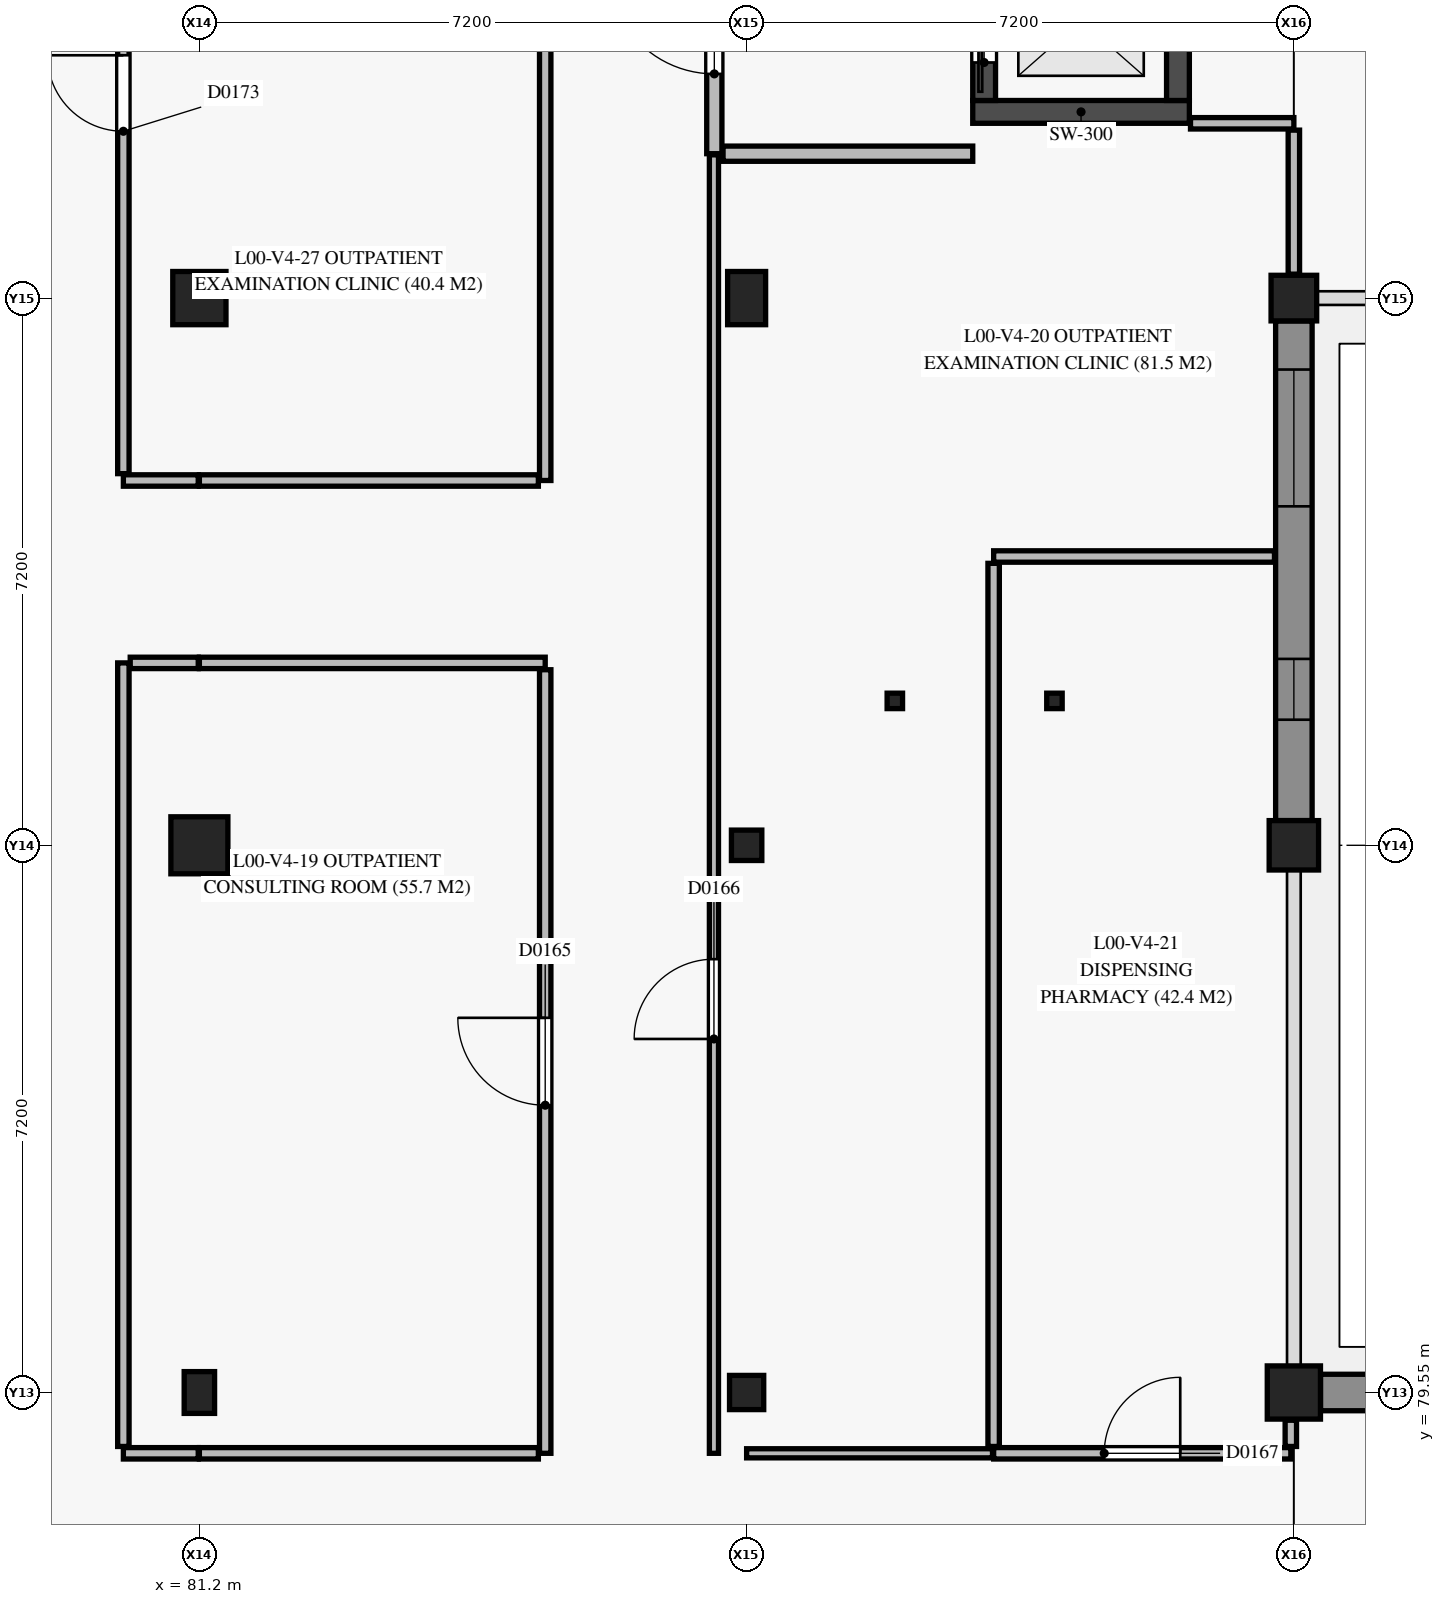
"""IFC4 building model, lengths in metres.
Left out: names, types, materials, properties, quantities, classifications, styles, units other than length and angle.
Written with IfcOpenShell. Run it as: python <this file> out.ifc"""

import sys

from ifc_helpers import new_model, si_unit, direction, frame, frame_2d, origin, origin_2d, place, context, subcontext, project, spatial, rectangle, hollow_rectangle, extrude, element, fill, save


model = new_model("IFC4")
c1 = context("Model", 3, precision=1e-05, world=origin(), true_north=direction((0.0, 1.0)))
c2 = subcontext(c1, "Body", "Model", "MODEL_VIEW")
j1 = project(units=[si_unit("LENGTHUNIT", "METRE"), si_unit("PLANEANGLEUNIT", "RADIAN")], contexts=[c1])
p1 = place(None, origin())
s1 = spatial("IfcSite", under=j1, at=p1, CompositionType="ELEMENT")
p2 = place(p1, origin())
s2 = spatial("IfcBuilding", under=s1, at=p2, CompositionType="ELEMENT")
p3 = place(p2, origin())
s3 = spatial("IfcBuildingStorey", under=s2, at=p3, CompositionType="ELEMENT", Elevation=0.0)
p4 = place(p3, frame((81.2, 79.55, 0.0), z_axis=(0.0, 0.0, 1.0), x_axis=(1.0, 0.0, 0.0)))
e1 = element("IfcColumn", 1, at=p4, inside=s3, PredefinedType="COLUMN", context=c2, shape_type="SweptSolid", body=[
    extrude(rectangle(XDim=0.4, YDim=0.55, at=origin_2d()), origin(), (0.0, 0.0, 1.0), 4.8),
])
p5 = place(p3, frame((81.2, 86.75, 0.0), z_axis=(0.0, 0.0, 1.0), x_axis=(1.0, 0.0, 0.0)))
e2 = element("IfcColumn", 2, at=p5, inside=s3, PredefinedType="COLUMN", context=c2, shape_type="SweptSolid", body=[
    extrude(rectangle(XDim=0.75, YDim=0.75, at=origin_2d()), origin(), (0.0, 0.0, 1.0), 4.8),
])
p6 = place(p3, frame((81.2, 93.95, 0.0), z_axis=(0.0, 0.0, 1.0), x_axis=(1.0, 0.0, 0.0)))
e3 = element("IfcColumn", 3, at=p6, inside=s3, PredefinedType="COLUMN", context=c2, shape_type="SweptSolid", body=[
    extrude(rectangle(XDim=0.7, YDim=0.7, at=origin_2d()), origin(), (0.0, 0.0, 1.0), 4.8),
])
p7 = place(p3, frame((88.4, 79.55, 0.0), z_axis=(0.0, 0.0, 1.0), x_axis=(1.0, 0.0, 0.0)))
e4 = element("IfcColumn", 4, at=p7, inside=s3, PredefinedType="COLUMN", context=c2, shape_type="SweptSolid", body=[
    extrude(rectangle(XDim=0.45, YDim=0.45, at=origin_2d()), origin(), (0.0, 0.0, 1.0), 4.8),
])
p8 = place(p3, frame((88.4, 86.75, 0.0), z_axis=(0.0, 0.0, 1.0), x_axis=(1.0, 0.0, 0.0)))
e5 = element("IfcColumn", 5, at=p8, inside=s3, PredefinedType="COLUMN", context=c2, shape_type="SweptSolid", body=[
    extrude(rectangle(XDim=0.4, YDim=0.4, at=origin_2d()), origin(), (0.0, 0.0, 1.0), 4.8),
])
p9 = place(p3, frame((88.4, 93.95, 0.0), z_axis=(0.0, 0.0, 1.0), x_axis=(1.0, 0.0, 0.0)))
e6 = element("IfcColumn", 6, at=p9, inside=s3, PredefinedType="COLUMN", context=c2, shape_type="SweptSolid", body=[
    extrude(rectangle(XDim=0.5, YDim=0.7, at=origin_2d()), origin(), (0.0, 0.0, 1.0), 4.8),
])
p10 = place(p3, frame((95.6, 79.55, 0.0), z_axis=(0.0, 0.0, 1.0), x_axis=(1.0, 0.0, 0.0)))
e7 = element("IfcColumn", 7, at=p10, inside=s3, PredefinedType="COLUMN", context=c2, shape_type="SweptSolid", body=[
    extrude(rectangle(XDim=0.7, YDim=0.7, at=origin_2d()), origin(), (0.0, 0.0, 1.0), 4.8),
])
p11 = place(p3, frame((95.6, 86.75, 0.0), z_axis=(0.0, 0.0, 1.0), x_axis=(1.0, 0.0, 0.0)))
e8 = element("IfcColumn", 8, at=p11, inside=s3, PredefinedType="COLUMN", context=c2, shape_type="SweptSolid", body=[
    extrude(rectangle(XDim=0.65, YDim=0.65, at=origin_2d()), origin(), (0.0, 0.0, 1.0), 4.8),
])
p12 = place(p3, frame((95.6, 93.95, 0.0), z_axis=(0.0, 0.0, 1.0), x_axis=(1.0, 0.0, 0.0)))
e9 = element("IfcColumn", 9, at=p12, inside=s3, PredefinedType="COLUMN", context=c2, shape_type="SweptSolid", body=[
    extrude(rectangle(XDim=0.6, YDim=0.6, at=origin_2d()), origin(), (0.0, 0.0, 1.0), 4.8),
])
p13 = place(p3, frame((91.375, 96.4, 0.0), z_axis=(0.0, 0.0, 1.0), x_axis=(1.0, 0.0, 0.0)))
e10 = element("IfcWall", 10, at=p13, inside=s3, PredefinedType="SHEAR", context=c2, shape_type="SweptSolid", body=[
    extrude(rectangle(XDim=2.85, YDim=0.3, at=frame_2d((1.425, 0.0))), origin(), (0.0, 0.0, 1.0), 4.55),
])
p14 = place(p3, frame((91.525, 96.55, 0.0), z_axis=(0.0, 0.0, 1.0), x_axis=(0.0, 1.0, 0.0)))
e11 = element("IfcWall", 11, at=p14, inside=s3, PredefinedType="SHEAR", context=c2, shape_type="SweptSolid", body=[
    extrude(rectangle(XDim=2.1, YDim=0.3, at=frame_2d((1.05, 0.0))), origin(), (0.0, 0.0, 1.0), 4.55),
])
p15 = place(p14, frame((0.5, 0.0, 0.0)))
e12 = element("IfcOpeningElement", 12, at=p15, cuts=e11, PredefinedType="OPENING", context=c2, shape_type="SweptSolid", body=[
    extrude(rectangle(XDim=1.1, YDim=2.15, at=frame_2d((0.55, 1.075))), frame((0.0, 0.16, 0.0), z_axis=(0.0, -1.0, 0.0), x_axis=(1.0, 0.0, 0.0)), (0.0, 0.0, 1.0), 0.32),
])
p16 = place(p3, frame((94.075, 96.55, 0.0), z_axis=(0.0, 0.0, 1.0), x_axis=(0.0, 1.0, 0.0)))
e13 = element("IfcWall", 13, at=p16, inside=s3, PredefinedType="SHEAR", context=c2, shape_type="SweptSolid", body=[
    extrude(rectangle(XDim=2.1, YDim=0.3, at=frame_2d((1.05, 0.0))), origin(), (0.0, 0.0, 1.0), 4.55),
])
p17 = place(p3, frame((95.6, 93.65, 0.0), z_axis=(0.0, 0.0, 1.0), x_axis=(0.0, -1.0, 0.0)))
e14 = element("IfcWall", 14, at=p17, inside=s3, PredefinedType="SOLIDWALL", context=c2, shape_type="SweptSolid", body=[
    extrude(rectangle(XDim=6.575, YDim=0.48, at=frame_2d((3.288, 0.0))), origin(), (0.0, 0.0, 1.0), 3.73),
])
p18 = place(p17, frame((0.64, 0.0, 0.9)))
e15 = element("IfcOpeningElement", 15, at=p18, cuts=e14, PredefinedType="OPENING", context=c2, shape_type="SweptSolid", body=[
    extrude(rectangle(XDim=1.8, YDim=0.9, at=frame_2d((0.9, 0.45))), frame((0.0, 0.25, 0.0), z_axis=(0.0, -1.0, 0.0), x_axis=(1.0, 0.0, 0.0)), (0.0, 0.0, 1.0), 0.5),
])
p19 = place(p17, frame((4.448, 0.0, 0.6)))
e16 = element("IfcOpeningElement", 16, at=p19, cuts=e14, PredefinedType="OPENING", context=c2, shape_type="SweptSolid", body=[
    extrude(rectangle(XDim=0.8, YDim=2.6, at=frame_2d((0.4, 1.3))), frame((0.0, 0.25, 0.0), z_axis=(0.0, -1.0, 0.0), x_axis=(1.0, 0.0, 0.0)), (0.0, 0.0, 1.0), 0.5),
])
p20 = place(p3, frame((95.95, 79.55, 0.0), z_axis=(0.0, 0.0, 1.0), x_axis=(1.0, 0.0, 0.0)))
e17 = element("IfcWall", 17, at=p20, inside=s3, PredefinedType="SOLIDWALL", context=c2, shape_type="SweptSolid", body=[
    extrude(rectangle(XDim=6.6, YDim=0.48, at=frame_2d((3.3, 0.0))), origin(), (0.0, 0.0, 1.0), 3.73),
])
p21 = place(p20, frame((2.5, 0.0, 0.0)))
e18 = element("IfcOpeningElement", 18, at=p21, cuts=e17, PredefinedType="OPENING", context=c2, shape_type="SweptSolid", body=[
    extrude(rectangle(XDim=1.6, YDim=2.3, at=frame_2d((0.8, 1.15))), frame((0.0, 0.25, 0.0), z_axis=(0.0, -1.0, 0.0), x_axis=(1.0, 0.0, 0.0)), (0.0, 0.0, 1.0), 0.5),
])
for number, where, z_axis, x_axis in (
    (19, (90.35, 88.65, 0.0), (0.0, 0.0, 1.0), (1.0, 0.0, 0.0)),
    (20, (92.45, 88.65, 0.0), (0.0, 0.0, 1.0), (1.0, 0.0, 0.0)),
):
    element("IfcColumn", number, at=place(p3, frame(where, z_axis=z_axis, x_axis=x_axis)), inside=s3, PredefinedType="COLUMN", context=c2, shape_type="SweptSolid", body=[
        extrude(hollow_rectangle(XDim=0.203, YDim=0.203, WallThickness=0.012, at=origin_2d()), origin(), (0.0, 0.0, 1.0), 4.8),
    ])
p22 = place(p3, frame((87.975, 95.85, 0.0), z_axis=(0.0, 0.0, 1.0), x_axis=(0.0, 1.0, 0.0)))
e21 = element("IfcWall", 21, at=p22, inside=s3, PredefinedType="PARTITIONING", context=c2, shape_type="SweptSolid", body=[
    extrude(rectangle(XDim=3.5, YDim=0.2, at=frame_2d((1.75, 0.0))), origin(), (0.0, 0.0, 1.0), 4.075),
])
p23 = place(p22, frame((1.05, 0.0, 0.0)))
e22 = element("IfcOpeningElement", 22, at=p23, cuts=e21, PredefinedType="OPENING", context=c2, shape_type="SweptSolid", body=[
    extrude(rectangle(XDim=1.4, YDim=2.2, at=frame_2d((0.7, 1.1))), frame((0.0, 0.11, 0.0), z_axis=(0.0, -1.0, 0.0), x_axis=(1.0, 0.0, 0.0)), (0.0, 0.0, 1.0), 0.22),
])
p24 = place(p3, frame((88.09, 95.85, 0.0), z_axis=(0.0, 0.0, 1.0), x_axis=(1.0, 0.0, 0.0)))
e23 = element("IfcWall", 23, at=p24, inside=s3, PredefinedType="PARTITIONING", context=c2, shape_type="SweptSolid", body=[
    extrude(rectangle(XDim=3.285, YDim=0.2, at=frame_2d((1.643, 0.0))), origin(), (0.0, 0.0, 1.0), 4.015),
])
p25 = place(p3, frame((81.2, 89.15, 0.0), z_axis=(0.0, 0.0, 1.0), x_axis=(1.0, 0.0, 0.0)))
e24 = element("IfcWall", 24, at=p25, inside=s3, PredefinedType="PARTITIONING", context=c2, shape_type="SweptSolid", body=[
    extrude(rectangle(XDim=4.55, YDim=0.15, at=frame_2d((2.275, 0.0))), origin(), (0.0, 0.0, 1.0), 4.055),
])
p26 = place(p3, frame((85.75, 78.75, 0.0), z_axis=(0.0, 0.0, 1.0), x_axis=(0.0, 1.0, 0.0)))
e25 = element("IfcWall", 25, at=p26, inside=s3, PredefinedType="PARTITIONING", context=c2, shape_type="SweptSolid", body=[
    extrude(rectangle(XDim=10.31, YDim=0.15, at=frame_2d((5.155, 0.0))), origin(), (0.0, 0.0, 1.0), 3.815),
])
p27 = place(p26, frame((4.58, 0.0, 0.0)))
e26 = element("IfcOpeningElement", 26, at=p27, cuts=e25, PredefinedType="OPENING", context=c2, shape_type="SweptSolid", body=[
    extrude(rectangle(XDim=1.15, YDim=2.15, at=frame_2d((0.575, 1.075))), frame((0.0, 0.085, 0.0), z_axis=(0.0, -1.0, 0.0), x_axis=(1.0, 0.0, 0.0)), (0.0, 0.0, 1.0), 0.17),
])
p28 = place(p3, frame((81.2, 78.75, 0.0), z_axis=(0.0, 0.0, 1.0), x_axis=(1.0, 0.0, 0.0)))
e27 = element("IfcWall", 27, at=p28, inside=s3, PredefinedType="PARTITIONING", context=c2, shape_type="SweptSolid", body=[
    extrude(rectangle(XDim=4.46, YDim=0.15, at=frame_2d((2.23, 0.0))), origin(), (0.0, 0.0, 1.0), 3.885),
])
p29 = place(p3, frame((80.2, 78.75, 0.0), z_axis=(0.0, 0.0, 1.0), x_axis=(1.0, 0.0, 0.0)))
e28 = element("IfcWall", 28, at=p29, inside=s3, PredefinedType="PARTITIONING", context=c2, shape_type="SweptSolid", body=[
    extrude(rectangle(XDim=0.985, YDim=0.15, at=frame_2d((0.493, 0.0))), origin(), (0.0, 0.0, 1.0), 3.885),
])
p30 = place(p3, frame((80.2, 78.84, 0.0), z_axis=(0.0, 0.0, 1.0), x_axis=(0.0, 1.0, 0.0)))
e29 = element("IfcWall", 29, at=p30, inside=s3, PredefinedType="PARTITIONING", context=c2, shape_type="SweptSolid", body=[
    extrude(rectangle(XDim=10.31, YDim=0.15, at=frame_2d((5.155, 0.0))), origin(), (0.0, 0.0, 1.0), 3.955),
])
p31 = place(p3, frame((80.29, 89.15, 0.0), z_axis=(0.0, 0.0, 1.0), x_axis=(1.0, 0.0, 0.0)))
e30 = element("IfcWall", 30, at=p31, inside=s3, PredefinedType="PARTITIONING", context=c2, shape_type="SweptSolid", body=[
    extrude(rectangle(XDim=0.895, YDim=0.15, at=frame_2d((0.448, 0.0))), origin(), (0.0, 0.0, 1.0), 4.055),
])
p32 = place(p3, frame((91.65, 78.75, 0.0), z_axis=(0.0, 0.0, 1.0), x_axis=(1.0, 0.0, 0.0)))
e31 = element("IfcWall", 31, at=p32, inside=s3, PredefinedType="PARTITIONING", context=c2, shape_type="SweptSolid", body=[
    extrude(rectangle(XDim=3.91, YDim=0.15, at=frame_2d((1.955, 0.0))), origin(), (0.0, 0.0, 1.0), 4.015),
])
p33 = place(p32, frame((1.455, 0.0, 0.0)))
e32 = element("IfcOpeningElement", 32, at=p33, cuts=e31, PredefinedType="OPENING", context=c2, shape_type="SweptSolid", body=[
    extrude(rectangle(XDim=1.0, YDim=2.15, at=frame_2d((0.5, 1.075))), frame((0.0, 0.085, 0.0), z_axis=(0.0, -1.0, 0.0), x_axis=(1.0, 0.0, 0.0)), (0.0, 0.0, 1.0), 0.17),
])
p34 = place(p3, frame((85.75, 91.55, 0.0), z_axis=(0.0, 0.0, 1.0), x_axis=(0.0, 1.0, 0.0)))
e33 = element("IfcWall", 33, at=p34, inside=s3, PredefinedType="PARTITIONING", context=c2, shape_type="SweptSolid", body=[
    extrude(rectangle(XDim=8.8, YDim=0.15, at=frame_2d((4.4, 0.0))), origin(), (0.0, 0.0, 1.0), 3.885),
])
p35 = place(p3, frame((81.2, 91.55, 0.0), z_axis=(0.0, 0.0, 1.0), x_axis=(1.0, 0.0, 0.0)))
e34 = element("IfcWall", 34, at=p35, inside=s3, PredefinedType="PARTITIONING", context=c2, shape_type="SweptSolid", body=[
    extrude(rectangle(XDim=4.46, YDim=0.15, at=frame_2d((2.23, 0.0))), origin(), (0.0, 0.0, 1.0), 4.055),
])
p36 = place(p3, frame((80.2, 91.55, 0.0), z_axis=(0.0, 0.0, 1.0), x_axis=(1.0, 0.0, 0.0)))
e35 = element("IfcWall", 35, at=p36, inside=s3, PredefinedType="PARTITIONING", context=c2, shape_type="SweptSolid", body=[
    extrude(rectangle(XDim=0.985, YDim=0.15, at=frame_2d((0.493, 0.0))), origin(), (0.0, 0.0, 1.0), 4.055),
])
p37 = place(p3, frame((80.2, 91.64, 0.0), z_axis=(0.0, 0.0, 1.0), x_axis=(0.0, 1.0, 0.0)))
e36 = element("IfcWall", 36, at=p37, inside=s3, PredefinedType="PARTITIONING", context=c2, shape_type="SweptSolid", body=[
    extrude(rectangle(XDim=10.01, YDim=0.15, at=frame_2d((5.005, 0.0))), origin(), (0.0, 0.0, 1.0), 3.815),
])
p38 = place(p37, frame((4.505, 0.0, 0.0)))
e37 = element("IfcOpeningElement", 37, at=p38, cuts=e36, PredefinedType="OPENING", context=c2, shape_type="SweptSolid", body=[
    extrude(rectangle(XDim=1.0, YDim=2.15, at=frame_2d((0.5, 1.075))), frame((0.0, 0.085, 0.0), z_axis=(0.0, -1.0, 0.0), x_axis=(1.0, 0.0, 0.0)), (0.0, 0.0, 1.0), 0.17),
])
p39 = place(p3, frame((88.4, 78.75, 0.0), z_axis=(0.0, 0.0, 1.0), x_axis=(1.0, 0.0, 0.0)))
e38 = element("IfcWall", 38, at=p39, inside=s3, PredefinedType="PARTITIONING", context=c2, shape_type="SweptSolid", body=[
    extrude(rectangle(XDim=3.235, YDim=0.12, at=frame_2d((1.618, 0.0))), origin(), (0.0, 0.0, 1.0), 3.815),
])
p40 = place(p3, frame((87.97, 78.75, 0.0), z_axis=(0.0, 0.0, 1.0), x_axis=(0.0, 1.0, 0.0)))
e39 = element("IfcWall", 39, at=p40, inside=s3, PredefinedType="PARTITIONING", context=c2, shape_type="SweptSolid", body=[
    extrude(rectangle(XDim=17.085, YDim=0.12, at=frame_2d((8.542, 0.0))), origin(), (0.0, 0.0, 1.0), 3.815),
])
p41 = place(p40, frame((5.452, 0.0, 0.0)))
e40 = element("IfcOpeningElement", 40, at=p41, cuts=e39, PredefinedType="OPENING", context=c2, shape_type="SweptSolid", body=[
    extrude(rectangle(XDim=1.05, YDim=2.15, at=frame_2d((0.525, 1.075))), frame((0.0, 0.07, 0.0), z_axis=(0.0, -1.0, 0.0), x_axis=(1.0, 0.0, 0.0)), (0.0, 0.0, 1.0), 0.14),
])
p42 = place(p3, frame((94.24, 96.25, 0.0), z_axis=(0.0, 0.0, 1.0), x_axis=(1.0, 0.0, 0.0)))
e41 = element("IfcWall", 41, at=p42, inside=s3, PredefinedType="PARTITIONING", context=c2, shape_type="SweptSolid", body=[
    extrude(rectangle(XDim=1.36, YDim=0.15, at=frame_2d((0.68, 0.0))), origin(), (0.0, 0.0, 1.0), 3.885),
])
p43 = place(p3, frame((95.6, 94.265, 0.0), z_axis=(0.0, 0.0, 1.0), x_axis=(0.0, 1.0, 0.0)))
e42 = element("IfcWall", 42, at=p43, inside=s3, PredefinedType="PARTITIONING", context=c2, shape_type="SweptSolid", body=[
    extrude(rectangle(XDim=1.895, YDim=0.15, at=frame_2d((0.948, 0.0))), origin(), (0.0, 0.0, 1.0), 3.885),
])
p44 = place(p3, frame((91.65, 90.55, 0.0), z_axis=(0.0, 0.0, 1.0), x_axis=(1.0, 0.0, 0.0)))
e43 = element("IfcWall", 43, at=p44, inside=s3, PredefinedType="PARTITIONING", context=c2, shape_type="SweptSolid", body=[
    extrude(rectangle(XDim=3.695, YDim=0.15, at=frame_2d((1.848, 0.0))), origin(), (0.0, 0.0, 1.0), 4.55),
])
p45 = place(p3, frame((91.65, 78.84, 0.0), z_axis=(0.0, 0.0, 1.0), x_axis=(0.0, 1.0, 0.0)))
e44 = element("IfcWall", 44, at=p45, inside=s3, PredefinedType="PARTITIONING", context=c2, shape_type="SweptSolid", body=[
    extrude(rectangle(XDim=11.62, YDim=0.15, at=frame_2d((5.81, 0.0))), origin(), (0.0, 0.0, 1.0), 3.735),
])
p46 = place(p3, frame((95.56, 78.84, 0.0), z_axis=(0.0, 0.0, 1.0), x_axis=(0.0, 1.0, 0.0)))
e45 = element("IfcWall", 45, at=p46, inside=s3, PredefinedType="PARTITIONING", context=c2, shape_type="SweptSolid", body=[
    extrude(rectangle(XDim=0.345, YDim=0.15, at=frame_2d((0.172, 0.0))), origin(), (0.0, 0.0, 1.0), 4.015),
])
p47 = place(p18, origin())
e46 = element("IfcWindow", 46, at=p47, inside=s3, PartitioningType="SINGLE_PANEL", PredefinedType="WINDOW", context=c2, shape_type="SweptSolid", body=[
    extrude(rectangle(XDim=1.8, YDim=0.9, at=frame_2d((0.9, 0.45))), frame((0.0, 0.03, 0.0), z_axis=(0.0, -1.0, 0.0), x_axis=(1.0, 0.0, 0.0)), (0.0, 0.0, 1.0), 0.06),
])
fill(e15, e46)
p48 = place(p19, origin())
e47 = element("IfcWindow", 47, at=p48, inside=s3, PartitioningType="SINGLE_PANEL", PredefinedType="WINDOW", context=c2, shape_type="SweptSolid", body=[
    extrude(rectangle(XDim=0.8, YDim=2.6, at=frame_2d((0.4, 1.3))), frame((0.0, 0.03, 0.0), z_axis=(0.0, -1.0, 0.0), x_axis=(1.0, 0.0, 0.0)), (0.0, 0.0, 1.0), 0.06),
])
fill(e16, e47)
p49 = place(p15, origin())
e48 = element("IfcDoor", 48, at=p49, inside=s3, OperationType="SLIDING_TO_LEFT", PredefinedType="DOOR", context=c2, shape_type="SweptSolid", body=[
    extrude(rectangle(XDim=1.1, YDim=2.15, at=frame_2d((0.55, 1.075))), frame((0.0, 0.025, 0.0), z_axis=(0.0, -1.0, 0.0), x_axis=(1.0, 0.0, 0.0)), (0.0, 0.0, 1.0), 0.05),
])
fill(e12, e48)
p50 = place(p23, origin())
e49 = element("IfcDoor", 49, at=p50, inside=s3, OperationType="SINGLE_SWING_RIGHT", PredefinedType="DOOR", context=c2, shape_type="SweptSolid", body=[
    extrude(rectangle(XDim=1.4, YDim=2.2, at=frame_2d((0.7, 1.1))), frame((0.0, 0.025, 0.0), z_axis=(0.0, -1.0, 0.0), x_axis=(1.0, 0.0, 0.0)), (0.0, 0.0, 1.0), 0.05),
])
fill(e22, e49)
p51 = place(p27, origin())
e50 = element("IfcDoor", 50, at=p51, inside=s3, OperationType="SINGLE_SWING_RIGHT", PredefinedType="DOOR", context=c2, shape_type="SweptSolid", body=[
    extrude(rectangle(XDim=1.15, YDim=2.15, at=frame_2d((0.575, 1.075))), frame((0.0, 0.025, 0.0), z_axis=(0.0, -1.0, 0.0), x_axis=(1.0, 0.0, 0.0)), (0.0, 0.0, 1.0), 0.05),
])
fill(e26, e50)
p52 = place(p41, origin())
e51 = element("IfcDoor", 51, at=p52, inside=s3, OperationType="SINGLE_SWING_LEFT", PredefinedType="DOOR", context=c2, shape_type="SweptSolid", body=[
    extrude(rectangle(XDim=1.05, YDim=2.15, at=frame_2d((0.525, 1.075))), frame((0.0, 0.025, 0.0), z_axis=(0.0, -1.0, 0.0), x_axis=(1.0, 0.0, 0.0)), (0.0, 0.0, 1.0), 0.05),
])
fill(e40, e51)
p53 = place(p33, origin())
e52 = element("IfcDoor", 52, at=p53, inside=s3, OperationType="SINGLE_SWING_RIGHT", PredefinedType="DOOR", context=c2, shape_type="SweptSolid", body=[
    extrude(rectangle(XDim=1.0, YDim=2.15, at=frame_2d((0.5, 1.075))), frame((0.0, 0.025, 0.0), z_axis=(0.0, -1.0, 0.0), x_axis=(1.0, 0.0, 0.0)), (0.0, 0.0, 1.0), 0.05),
])
fill(e32, e52)
p54 = place(p38, origin())
e53 = element("IfcDoor", 53, at=p54, inside=s3, OperationType="SINGLE_SWING_RIGHT", PredefinedType="DOOR", context=c2, shape_type="SweptSolid", body=[
    extrude(rectangle(XDim=1.0, YDim=2.15, at=frame_2d((0.5, 1.075))), frame((0.0, 0.025, 0.0), z_axis=(0.0, -1.0, 0.0), x_axis=(1.0, 0.0, 0.0)), (0.0, 0.0, 1.0), 0.05),
])
fill(e37, e53)
save(model, sys.argv[1])
